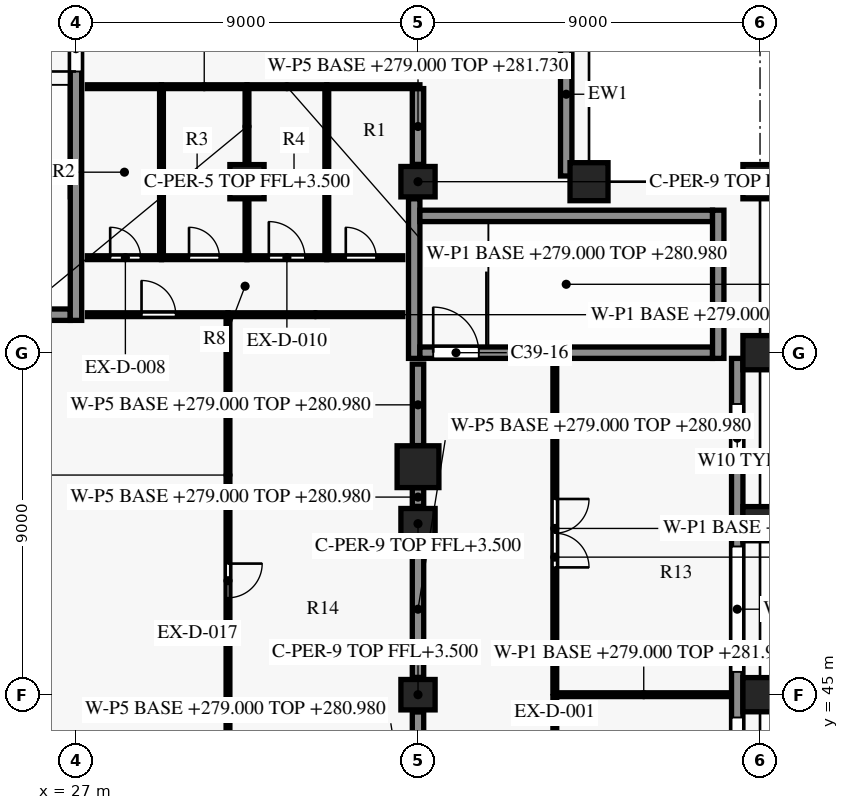
"""IFC4 building model, lengths in metres.
Left out: names, types, materials, properties, quantities, classifications, styles, units other than length and angle.
Written with IfcOpenShell. Run it as: python <this file> out.ifc"""

import sys

from ifc_helpers import new_model, si_unit, direction, frame, frame_2d, origin, origin_2d, place, context, subcontext, project, spatial, rectangle, extrude, element, fill, save


model = new_model("IFC4")
c1 = context("Model", 3, precision=1e-05, world=origin(), true_north=direction((0.0, 1.0)))
c2 = subcontext(c1, "Body", "Model", "MODEL_VIEW")
j1 = project(units=[si_unit("LENGTHUNIT", "METRE"), si_unit("PLANEANGLEUNIT", "RADIAN")], contexts=[c1])
p1 = place(None, origin())
s1 = spatial("IfcSite", under=j1, at=p1, CompositionType="ELEMENT")
p2 = place(p1, origin())
s2 = spatial("IfcBuilding", under=s1, at=p2, CompositionType="ELEMENT")
p3 = place(p2, frame((0.0, 0.0, 279.0)))
s3 = spatial("IfcBuildingStorey", under=s2, at=p3, CompositionType="ELEMENT", Elevation=279.0)
for number, where, z_axis, x_axis in (
    (1, (45.0, 45.0, 0.0), (0.0, 0.0, 1.0), (0.0, 1.0, 0.0)),
    (2, (45.0, 49.5, 0.0), (0.0, 0.0, 1.0), (0.0, 1.0, 0.0)),
    (3, (45.0, 54.0, 0.0), (0.0, 0.0, 1.0), (0.0, 1.0, 0.0)),
    (4, (45.0, 58.5, 0.0), (0.0, 0.0, 1.0), (0.0, 1.0, 0.0)),
):
    element("IfcColumn", number, at=place(p3, frame(where, z_axis=z_axis, x_axis=x_axis)), inside=s3, PredefinedType="COLUMN", context=c2, shape_type="SweptSolid", body=[
        extrude(rectangle(XDim=0.9, YDim=0.9, at=origin_2d()), origin(), (0.0, 0.0, 1.0), 3.8),
    ])
p4 = place(p3, frame((40.5, 58.5, 0.0), z_axis=(0.0, 0.0, 1.0), x_axis=(1.0, 0.0, 0.0)))
e5 = element("IfcColumn", 5, at=p4, inside=s3, PredefinedType="COLUMN", context=c2, shape_type="SweptSolid", body=[
    extrude(rectangle(XDim=1.0, YDim=1.0, at=origin_2d()), origin(), (0.0, 0.0, 1.0), 3.8),
])
p5 = place(p3, frame((36.0, 51.0, 0.0), z_axis=(0.0, 0.0, 1.0), x_axis=(1.0, 0.0, 0.0)))
e6 = element("IfcColumn", 6, at=p5, inside=s3, PredefinedType="COLUMN", context=c2, shape_type="SweptSolid", body=[
    extrude(rectangle(XDim=1.1, YDim=1.1, at=origin_2d()), origin(), (0.0, 0.0, 1.0), 3.8),
])
p6 = place(p3, frame((44.4, 53.85, 0.0), z_axis=(0.0, 0.0, 1.0), x_axis=(0.0, -1.0, 0.0)))
e7 = element("IfcWall", 7, at=p6, inside=s3, PredefinedType="SOLIDWALL", context=c2, shape_type="SweptSolid", body=[
    extrude(rectangle(XDim=21.602, YDim=0.3, at=frame_2d((10.801, 0.0))), origin(), (0.0, 0.0, 1.0), 3.15),
])
p7 = place(p6, frame((1.2, 0.0, 0.75)))
e8 = element("IfcOpeningElement", 8, at=p7, cuts=e7, PredefinedType="OPENING", context=c2, shape_type="SweptSolid", body=[
    extrude(rectangle(XDim=1.8, YDim=1.8, at=frame_2d((0.9, 0.9))), frame((0.0, 0.16, 0.0), z_axis=(0.0, -1.0, 0.0), x_axis=(1.0, 0.0, 0.0)), (0.0, 0.0, 1.0), 0.32),
])
p8 = place(p6, frame((4.95, 0.0, 0.15)))
e9 = element("IfcOpeningElement", 9, at=p8, cuts=e7, PredefinedType="OPENING", context=c2, shape_type="SweptSolid", body=[
    extrude(rectangle(XDim=3.3, YDim=2.4, at=frame_2d((1.65, 1.2))), frame((0.0, 0.16, 0.0), z_axis=(0.0, -1.0, 0.0), x_axis=(1.0, 0.0, 0.0)), (0.0, 0.0, 1.0), 0.32),
])
p9 = place(p6, frame((9.45, 0.0, 0.15)))
e10 = element("IfcOpeningElement", 10, at=p9, cuts=e7, PredefinedType="OPENING", context=c2, shape_type="SweptSolid", body=[
    extrude(rectangle(XDim=3.3, YDim=2.4, at=frame_2d((1.65, 1.2))), frame((0.0, 0.16, 0.0), z_axis=(0.0, -1.0, 0.0), x_axis=(1.0, 0.0, 0.0)), (0.0, 0.0, 1.0), 0.32),
])
p10 = place(p6, frame((14.7, 0.0, 0.75)))
e11 = element("IfcOpeningElement", 11, at=p10, cuts=e7, PredefinedType="OPENING", context=c2, shape_type="SweptSolid", body=[
    extrude(rectangle(XDim=1.8, YDim=1.8, at=frame_2d((0.9, 0.9))), frame((0.0, 0.16, 0.0), z_axis=(0.0, -1.0, 0.0), x_axis=(1.0, 0.0, 0.0)), (0.0, 0.0, 1.0), 0.32),
])
p11 = place(p6, frame((19.2, 0.0, 0.75)))
e12 = element("IfcOpeningElement", 12, at=p11, cuts=e7, PredefinedType="OPENING", context=c2, shape_type="SweptSolid", body=[
    extrude(rectangle(XDim=1.8, YDim=1.8, at=frame_2d((0.9, 0.9))), frame((0.0, 0.16, 0.0), z_axis=(0.0, -1.0, 0.0), x_axis=(1.0, 0.0, 0.0)), (0.0, 0.0, 1.0), 0.32),
])
p12 = place(p3, frame((39.9, 62.953, 0.0), z_axis=(0.0, 0.0, 1.0), x_axis=(0.0, -1.0, 0.0)))
e13 = element("IfcWall", 13, at=p12, inside=s3, PredefinedType="SOLIDWALL", context=c2, shape_type="SweptSolid", body=[
    extrude(rectangle(XDim=4.303, YDim=0.3, at=frame_2d((2.151, 0.0))), origin(), (0.0, 0.0, 1.0), 3.15),
])
p13 = place(p3, frame((36.05, 54.0, 0.0), z_axis=(0.0, 0.0, 1.0), x_axis=(1.0, 0.0, 0.0)))
e14 = element("IfcWall", 14, at=p13, inside=s3, PredefinedType="SHEAR", context=c2, shape_type="SweptSolid", body=[
    extrude(rectangle(XDim=7.7, YDim=0.3, at=frame_2d((3.85, 0.0))), origin(), (0.0, 0.0, 1.0), 3.5),
])
p14 = place(p13, frame((0.35, 0.0, 0.0)))
e15 = element("IfcOpeningElement", 15, at=p14, cuts=e14, PredefinedType="OPENING", context=c2, shape_type="SweptSolid", body=[
    extrude(rectangle(XDim=1.2, YDim=2.2, at=frame_2d((0.6, 1.1))), frame((0.0, 0.16, 0.0), z_axis=(0.0, -1.0, 0.0), x_axis=(1.0, 0.0, 0.0)), (0.0, 0.0, 1.0), 0.32),
])
p15 = place(p3, frame((23.4, 55.0, 0.0), z_axis=(0.0, 0.0, 1.0), x_axis=(1.0, 0.0, 0.0)))
e16 = element("IfcWall", 16, at=p15, inside=s3, PredefinedType="SHEAR", context=c2, shape_type="SweptSolid", body=[
    extrude(rectangle(XDim=3.45, YDim=0.3, at=frame_2d((1.725, 0.0))), origin(), (0.0, 0.0, 1.0), 3.5),
])
p16 = place(p3, frame((36.05, 57.6, 0.0), z_axis=(0.0, 0.0, 1.0), x_axis=(1.0, 0.0, 0.0)))
e17 = element("IfcWall", 17, at=p16, inside=s3, PredefinedType="SHEAR", context=c2, shape_type="SweptSolid", body=[
    extrude(rectangle(XDim=7.7, YDim=0.3, at=frame_2d((3.85, 0.0))), origin(), (0.0, 0.0, 1.0), 3.5),
])
p17 = place(p3, frame((27.0, 54.85, 0.0), z_axis=(0.0, 0.0, 1.0), x_axis=(0.0, 1.0, 0.0)))
e18 = element("IfcWall", 18, at=p17, inside=s3, PredefinedType="SHEAR", context=c2, shape_type="SweptSolid", body=[
    extrude(rectangle(XDim=8.6, YDim=0.3, at=frame_2d((4.3, 0.0))), origin(), (0.0, 0.0, 1.0), 3.5),
])
p18 = place(p17, frame((6.55, 0.0, 0.0)))
e19 = element("IfcOpeningElement", 19, at=p18, cuts=e18, PredefinedType="OPENING", context=c2, shape_type="SweptSolid", body=[
    extrude(rectangle(XDim=1.2, YDim=2.2, at=frame_2d((0.6, 1.1))), frame((0.0, 0.16, 0.0), z_axis=(0.0, -1.0, 0.0), x_axis=(1.0, 0.0, 0.0)), (0.0, 0.0, 1.0), 0.32),
])
p19 = place(p3, frame((35.9, 53.85, 0.0), z_axis=(0.0, 0.0, 1.0), x_axis=(0.0, 1.0, 0.0)))
e20 = element("IfcWall", 20, at=p19, inside=s3, PredefinedType="SHEAR", context=c2, shape_type="SweptSolid", body=[
    extrude(rectangle(XDim=4.2, YDim=0.3, at=frame_2d((2.1, 0.0))), origin(), (0.0, 0.0, 1.0), 3.5),
])
p20 = place(p3, frame((43.9, 53.85, 0.0), z_axis=(0.0, 0.0, 1.0), x_axis=(0.0, 1.0, 0.0)))
e21 = element("IfcWall", 21, at=p20, inside=s3, PredefinedType="SHEAR", context=c2, shape_type="SweptSolid", body=[
    extrude(rectangle(XDim=3.9, YDim=0.3, at=frame_2d((1.95, 0.0))), origin(), (0.0, 0.0, 1.0), 3.5),
])
p21 = place(p3, frame((36.0, 40.97, 0.0), z_axis=(0.0, 0.0, 1.0), x_axis=(0.0, 1.0, 0.0)))
e22 = element("IfcWall", 22, at=p21, inside=s3, PredefinedType="PARTITIONING", context=c2, shape_type="SweptSolid", body=[
    extrude(rectangle(XDim=3.575, YDim=0.3, at=frame_2d((1.788, 0.0))), origin(), (0.0, 0.0, 1.0), 1.98),
])
p22 = place(p3, frame((39.6, 44.95, 0.0), z_axis=(0.0, 0.0, 1.0), x_axis=(0.0, -1.0, 0.0)))
e23 = element("IfcWall", 23, at=p22, inside=s3, PredefinedType="PARTITIONING", context=c2, shape_type="SweptSolid", body=[
    extrude(rectangle(XDim=4.4, YDim=0.1, at=frame_2d((2.2, 0.0))), origin(), (0.0, 0.0, 1.0), 2.98),
])
p23 = place(p22, frame((1.75, 0.0, 0.0)))
e24 = element("IfcOpeningElement", 24, at=p23, cuts=e23, PredefinedType="OPENING", context=c2, shape_type="SweptSolid", body=[
    extrude(rectangle(XDim=0.9, YDim=2.1, at=frame_2d((0.45, 1.05))), frame((0.0, 0.06, 0.0), z_axis=(0.0, -1.0, 0.0), x_axis=(1.0, 0.0, 0.0)), (0.0, 0.0, 1.0), 0.12),
])
p24 = place(p3, frame((39.65, 45.0, 0.0), z_axis=(0.0, 0.0, 1.0), x_axis=(1.0, 0.0, 0.0)))
e25 = element("IfcWall", 25, at=p24, inside=s3, PredefinedType="PARTITIONING", context=c2, shape_type="SweptSolid", body=[
    extrude(rectangle(XDim=4.58, YDim=0.1, at=frame_2d((2.29, 0.0))), origin(), (0.0, 0.0, 1.0), 2.98),
])
p25 = place(p3, frame((36.0, 45.455, 0.0), z_axis=(0.0, 0.0, 1.0), x_axis=(0.0, 1.0, 0.0)))
e26 = element("IfcWall", 26, at=p25, inside=s3, PredefinedType="PARTITIONING", context=c2, shape_type="SweptSolid", body=[
    extrude(rectangle(XDim=3.59, YDim=0.3, at=frame_2d((1.795, 0.0))), origin(), (0.0, 0.0, 1.0), 1.98),
])
p26 = place(p3, frame((36.0, 49.955, 0.0), z_axis=(0.0, 0.0, 1.0), x_axis=(0.0, 1.0, 0.0)))
e27 = element("IfcWall", 27, at=p26, inside=s3, PredefinedType="PARTITIONING", context=c2, shape_type="SweptSolid", body=[
    extrude(rectangle(XDim=0.49, YDim=0.3, at=frame_2d((0.245, 0.0))), origin(), (0.0, 0.0, 1.0), 1.98),
])
p27 = place(p3, frame((36.0, 51.555, 0.0), z_axis=(0.0, 0.0, 1.0), x_axis=(0.0, 1.0, 0.0)))
e28 = element("IfcWall", 28, at=p27, inside=s3, PredefinedType="PARTITIONING", context=c2, shape_type="SweptSolid", body=[
    extrude(rectangle(XDim=2.145, YDim=0.3, at=frame_2d((1.073, 0.0))), origin(), (0.0, 0.0, 1.0), 1.98),
])
p28 = place(p3, frame((39.6, 53.7, 0.0), z_axis=(0.0, 0.0, 1.0), x_axis=(0.0, -1.0, 0.0)))
e29 = element("IfcWall", 29, at=p28, inside=s3, PredefinedType="PARTITIONING", context=c2, shape_type="SweptSolid", body=[
    extrude(rectangle(XDim=8.65, YDim=0.1, at=frame_2d((4.325, 0.0))), origin(), (0.0, 0.0, 1.0), 2.73),
])
p29 = place(p28, frame((3.55, 0.0, 0.0)))
e30 = element("IfcOpeningElement", 30, at=p29, cuts=e29, PredefinedType="OPENING", context=c2, shape_type="SweptSolid", body=[
    extrude(rectangle(XDim=1.8, YDim=2.1, at=frame_2d((0.9, 1.05))), frame((0.0, 0.06, 0.0), z_axis=(0.0, -1.0, 0.0), x_axis=(1.0, 0.0, 0.0)), (0.0, 0.0, 1.0), 0.12),
])
p30 = place(p3, frame((31.0, 54.95, 0.0), z_axis=(0.0, 0.0, 1.0), x_axis=(0.0, -1.0, 0.0)))
e31 = element("IfcWall", 31, at=p30, inside=s3, PredefinedType="PARTITIONING", context=c2, shape_type="SweptSolid", body=[
    extrude(rectangle(XDim=13.9, YDim=0.1, at=frame_2d((6.95, 0.0))), origin(), (0.0, 0.0, 1.0), 2.98),
])
p31 = place(p30, frame((6.5, 0.0, 0.0)))
e32 = element("IfcOpeningElement", 32, at=p31, cuts=e31, PredefinedType="OPENING", context=c2, shape_type="SweptSolid", body=[
    extrude(rectangle(XDim=0.9, YDim=2.1, at=frame_2d((0.45, 1.05))), frame((0.0, 0.06, 0.0), z_axis=(0.0, -1.0, 0.0), x_axis=(1.0, 0.0, 0.0)), (0.0, 0.0, 1.0), 0.12),
])
p32 = place(p3, frame((27.3, 55.0, 0.0), z_axis=(0.0, 0.0, 1.0), x_axis=(1.0, 0.0, 0.0)))
e33 = element("IfcWall", 33, at=p32, inside=s3, PredefinedType="PARTITIONING", context=c2, shape_type="SweptSolid", body=[
    extrude(rectangle(XDim=3.7, YDim=0.1, at=frame_2d((1.85, 0.0))), origin(), (0.0, 0.0, 1.0), 3.33),
])
p33 = place(p32, frame((1.425, 0.0, 0.0)))
e34 = element("IfcOpeningElement", 34, at=p33, cuts=e33, PredefinedType="OPENING", context=c2, shape_type="SweptSolid", body=[
    extrude(rectangle(XDim=0.9, YDim=2.1, at=frame_2d((0.45, 1.05))), frame((0.0, 0.06, 0.0), z_axis=(0.0, -1.0, 0.0), x_axis=(1.0, 0.0, 0.0)), (0.0, 0.0, 1.0), 0.12),
])
p34 = place(p3, frame((35.6, 55.0, 0.0), z_axis=(0.0, 0.0, 1.0), x_axis=(-1.0, 0.0, 0.0)))
e35 = element("IfcWall", 35, at=p34, inside=s3, PredefinedType="PARTITIONING", context=c2, shape_type="SweptSolid", body=[
    extrude(rectangle(XDim=4.6, YDim=0.1, at=frame_2d((2.3, 0.0))), origin(), (0.0, 0.0, 1.0), 2.88),
])
p35 = place(p3, frame((27.3, 56.5, 0.0), z_axis=(0.0, 0.0, 1.0), x_axis=(1.0, 0.0, 0.0)))
e36 = element("IfcWall", 36, at=p35, inside=s3, PredefinedType="PARTITIONING", context=c2, shape_type="SweptSolid", body=[
    extrude(rectangle(XDim=1.95, YDim=0.1, at=frame_2d((0.975, 0.0))), origin(), (0.0, 0.0, 1.0), 3.33),
])
p36 = place(p35, frame((0.6, 0.0, 0.0)))
e37 = element("IfcOpeningElement", 37, at=p36, cuts=e36, PredefinedType="OPENING", context=c2, shape_type="SweptSolid", body=[
    extrude(rectangle(XDim=0.8, YDim=2.1, at=frame_2d((0.4, 1.05))), frame((0.0, 0.06, 0.0), z_axis=(0.0, -1.0, 0.0), x_axis=(1.0, 0.0, 0.0)), (0.0, 0.0, 1.0), 0.12),
])
p37 = place(p3, frame((29.25, 56.5, 0.0), z_axis=(0.0, 0.0, 1.0), x_axis=(1.0, 0.0, 0.0)))
e38 = element("IfcWall", 38, at=p37, inside=s3, PredefinedType="PARTITIONING", context=c2, shape_type="SweptSolid", body=[
    extrude(rectangle(XDim=2.25, YDim=0.1, at=frame_2d((1.125, 0.0))), origin(), (0.0, 0.0, 1.0), 3.33),
])
p38 = place(p37, frame((0.725, 0.0, 0.0)))
e39 = element("IfcOpeningElement", 39, at=p38, cuts=e38, PredefinedType="OPENING", context=c2, shape_type="SweptSolid", body=[
    extrude(rectangle(XDim=0.8, YDim=2.1, at=frame_2d((0.4, 1.05))), frame((0.0, 0.06, 0.0), z_axis=(0.0, -1.0, 0.0), x_axis=(1.0, 0.0, 0.0)), (0.0, 0.0, 1.0), 0.12),
])
p39 = place(p3, frame((31.5, 56.5, 0.0), z_axis=(0.0, 0.0, 1.0), x_axis=(1.0, 0.0, 0.0)))
e40 = element("IfcWall", 40, at=p39, inside=s3, PredefinedType="PARTITIONING", context=c2, shape_type="SweptSolid", body=[
    extrude(rectangle(XDim=2.1, YDim=0.1, at=frame_2d((1.05, 0.0))), origin(), (0.0, 0.0, 1.0), 3.33),
])
p40 = place(p39, frame((0.575, 0.0, 0.0)))
e41 = element("IfcOpeningElement", 41, at=p40, cuts=e40, PredefinedType="OPENING", context=c2, shape_type="SweptSolid", body=[
    extrude(rectangle(XDim=0.95, YDim=2.1, at=frame_2d((0.475, 1.05))), frame((0.0, 0.06, 0.0), z_axis=(0.0, -1.0, 0.0), x_axis=(1.0, 0.0, 0.0)), (0.0, 0.0, 1.0), 0.12),
])
p41 = place(p3, frame((33.6, 56.5, 0.0), z_axis=(0.0, 0.0, 1.0), x_axis=(1.0, 0.0, 0.0)))
e42 = element("IfcWall", 42, at=p41, inside=s3, PredefinedType="PARTITIONING", context=c2, shape_type="SweptSolid", body=[
    extrude(rectangle(XDim=2.0, YDim=0.1, at=frame_2d((1.0, 0.0))), origin(), (0.0, 0.0, 1.0), 2.88),
])
p42 = place(p41, frame((0.5, 0.0, 0.0)))
e43 = element("IfcOpeningElement", 43, at=p42, cuts=e42, PredefinedType="OPENING", context=c2, shape_type="SweptSolid", body=[
    extrude(rectangle(XDim=0.8, YDim=2.1, at=frame_2d((0.4, 1.05))), frame((0.0, 0.06, 0.0), z_axis=(0.0, -1.0, 0.0), x_axis=(1.0, 0.0, 0.0)), (0.0, 0.0, 1.0), 0.12),
])
p43 = place(p3, frame((31.5, 58.045, 0.0), z_axis=(0.0, 0.0, 1.0), x_axis=(0.0, -1.0, 0.0)))
e44 = element("IfcWall", 44, at=p43, inside=s3, PredefinedType="PARTITIONING", context=c2, shape_type="SweptSolid", body=[
    extrude(rectangle(XDim=1.495, YDim=0.1, at=frame_2d((0.748, 0.0))), origin(), (0.0, 0.0, 1.0), 3.33),
])
p44 = place(p3, frame((29.25, 60.95, 0.0), z_axis=(0.0, 0.0, 1.0), x_axis=(0.0, -1.0, 0.0)))
e45 = element("IfcWall", 45, at=p44, inside=s3, PredefinedType="PARTITIONING", context=c2, shape_type="SweptSolid", body=[
    extrude(rectangle(XDim=4.4, YDim=0.1, at=frame_2d((2.2, 0.0))), origin(), (0.0, 0.0, 1.0), 3.33),
])
p45 = place(p3, frame((31.5, 60.95, 0.0), z_axis=(0.0, 0.0, 1.0), x_axis=(0.0, -1.0, 0.0)))
e46 = element("IfcWall", 46, at=p45, inside=s3, PredefinedType="PARTITIONING", context=c2, shape_type="SweptSolid", body=[
    extrude(rectangle(XDim=1.995, YDim=0.1, at=frame_2d((0.998, 0.0))), origin(), (0.0, 0.0, 1.0), 1.98),
])
p46 = place(p3, frame((33.6, 60.95, 0.0), z_axis=(0.0, 0.0, 1.0), x_axis=(0.0, -1.0, 0.0)))
e47 = element("IfcWall", 47, at=p46, inside=s3, PredefinedType="PARTITIONING", context=c2, shape_type="SweptSolid", body=[
    extrude(rectangle(XDim=4.4, YDim=0.1, at=frame_2d((2.2, 0.0))), origin(), (0.0, 0.0, 1.0), 1.98),
])
p47 = place(p3, frame((36.0, 60.95, 0.0), z_axis=(0.0, 0.0, 1.0), x_axis=(0.0, -1.0, 0.0)))
e48 = element("IfcWall", 48, at=p47, inside=s3, PredefinedType="PARTITIONING", context=c2, shape_type="SweptSolid", body=[
    extrude(rectangle(XDim=1.995, YDim=0.3, at=frame_2d((0.998, 0.0))), origin(), (0.0, 0.0, 1.0), 2.73),
])
p48 = place(p3, frame((27.3, 61.0, 0.0), z_axis=(0.0, 0.0, 1.0), x_axis=(1.0, 0.0, 0.0)))
e49 = element("IfcWall", 49, at=p48, inside=s3, PredefinedType="PARTITIONING", context=c2, shape_type="SweptSolid", body=[
    extrude(rectangle(XDim=1.95, YDim=0.1, at=frame_2d((0.975, 0.0))), origin(), (0.0, 0.0, 1.0), 3.33),
])
p49 = place(p3, frame((29.25, 61.0, 0.0), z_axis=(0.0, 0.0, 1.0), x_axis=(1.0, 0.0, 0.0)))
e50 = element("IfcWall", 50, at=p49, inside=s3, PredefinedType="PARTITIONING", context=c2, shape_type="SweptSolid", body=[
    extrude(rectangle(XDim=2.25, YDim=0.1, at=frame_2d((1.125, 0.0))), origin(), (0.0, 0.0, 1.0), 1.98),
])
p50 = place(p3, frame((31.5, 61.0, 0.0), z_axis=(0.0, 0.0, 1.0), x_axis=(1.0, 0.0, 0.0)))
e51 = element("IfcWall", 51, at=p50, inside=s3, PredefinedType="PARTITIONING", context=c2, shape_type="SweptSolid", body=[
    extrude(rectangle(XDim=2.1, YDim=0.1, at=frame_2d((1.05, 0.0))), origin(), (0.0, 0.0, 1.0), 1.98),
])
p51 = place(p3, frame((33.6, 61.0, 0.0), z_axis=(0.0, 0.0, 1.0), x_axis=(1.0, 0.0, 0.0)))
e52 = element("IfcWall", 52, at=p51, inside=s3, PredefinedType="PARTITIONING", context=c2, shape_type="SweptSolid", body=[
    extrude(rectangle(XDim=2.45, YDim=0.1, at=frame_2d((1.225, 0.0))), origin(), (0.0, 0.0, 1.0), 2.73),
])
p52 = place(p3, frame((31.5, 58.5, 0.0), z_axis=(0.0, 0.0, 1.0), x_axis=(1.0, 0.0, 0.0)))
e53 = element("IfcColumn", 53, at=p52, inside=s3, PredefinedType="COLUMN", context=c2, shape_type="SweptSolid", body=[
    extrude(rectangle(XDim=0.9, YDim=0.9, at=origin_2d()), origin(), (0.0, 0.0, 1.0), 3.5),
])
for number, where, z_axis, x_axis in (
    (54, (36.0, 45.0, 0.0), (0.0, 0.0, 1.0), (0.0, 1.0, 0.0)),
    (55, (36.0, 49.5, 0.0), (0.0, 0.0, 1.0), (0.0, 1.0, 0.0)),
    (56, (36.0, 58.5, 0.0), (0.0, 0.0, 1.0), (0.0, 1.0, 0.0)),
):
    element("IfcColumn", number, at=place(p3, frame(where, z_axis=z_axis, x_axis=x_axis)), inside=s3, PredefinedType="COLUMN", context=c2, shape_type="SweptSolid", body=[
        extrude(rectangle(XDim=0.9, YDim=0.8, at=origin_2d()), origin(), (0.0, 0.0, 1.0), 3.5),
    ])
p53 = place(p7, origin())
e57 = element("IfcWindow", 57, at=p53, inside=s3, PartitioningType="SINGLE_PANEL", PredefinedType="WINDOW", context=c2, shape_type="SweptSolid", body=[
    extrude(rectangle(XDim=1.8, YDim=1.8, at=frame_2d((0.9, 0.9))), frame((0.0, 0.03, 0.0), z_axis=(0.0, -1.0, 0.0), x_axis=(1.0, 0.0, 0.0)), (0.0, 0.0, 1.0), 0.06),
])
fill(e8, e57)
p54 = place(p8, origin())
e58 = element("IfcWindow", 58, at=p54, inside=s3, PartitioningType="SINGLE_PANEL", PredefinedType="WINDOW", context=c2, shape_type="SweptSolid", body=[
    extrude(rectangle(XDim=3.3, YDim=2.4, at=frame_2d((1.65, 1.2))), frame((0.0, 0.03, 0.0), z_axis=(0.0, -1.0, 0.0), x_axis=(1.0, 0.0, 0.0)), (0.0, 0.0, 1.0), 0.06),
])
fill(e9, e58)
p55 = place(p9, origin())
e59 = element("IfcWindow", 59, at=p55, inside=s3, PartitioningType="SINGLE_PANEL", PredefinedType="WINDOW", context=c2, shape_type="SweptSolid", body=[
    extrude(rectangle(XDim=3.3, YDim=2.4, at=frame_2d((1.65, 1.2))), frame((0.0, 0.03, 0.0), z_axis=(0.0, -1.0, 0.0), x_axis=(1.0, 0.0, 0.0)), (0.0, 0.0, 1.0), 0.06),
])
fill(e10, e59)
p56 = place(p18, origin())
e60 = element("IfcDoor", 60, at=p56, inside=s3, OperationType="SINGLE_SWING_LEFT", PredefinedType="DOOR", context=c2, shape_type="SweptSolid", body=[
    extrude(rectangle(XDim=1.2, YDim=2.2, at=frame_2d((0.6, 1.1))), frame((0.0, 0.025, 0.0), z_axis=(0.0, -1.0, 0.0), x_axis=(1.0, 0.0, 0.0)), (0.0, 0.0, 1.0), 0.05),
])
fill(e19, e60)
p57 = place(p14, origin())
e61 = element("IfcDoor", 61, at=p57, inside=s3, OperationType="SINGLE_SWING_LEFT", PredefinedType="DOOR", context=c2, shape_type="SweptSolid", body=[
    extrude(rectangle(XDim=1.2, YDim=2.2, at=frame_2d((0.6, 1.1))), frame((0.0, 0.025, 0.0), z_axis=(0.0, -1.0, 0.0), x_axis=(1.0, 0.0, 0.0)), (0.0, 0.0, 1.0), 0.05),
])
fill(e15, e61)
p58 = place(p29, origin())
e62 = element("IfcDoor", 62, at=p58, inside=s3, OperationType="DOUBLE_DOOR_SINGLE_SWING", PredefinedType="DOOR", context=c2, shape_type="SweptSolid", body=[
    extrude(rectangle(XDim=1.8, YDim=2.1, at=frame_2d((0.9, 1.05))), frame((0.0, 0.025, 0.0), z_axis=(0.0, -1.0, 0.0), x_axis=(1.0, 0.0, 0.0)), (0.0, 0.0, 1.0), 0.05),
])
fill(e30, e62)
p59 = place(p33, origin())
e63 = element("IfcDoor", 63, at=p59, inside=s3, OperationType="SINGLE_SWING_RIGHT", PredefinedType="DOOR", context=c2, shape_type="SweptSolid", body=[
    extrude(rectangle(XDim=0.9, YDim=2.1, at=frame_2d((0.45, 1.05))), frame((0.0, 0.025, 0.0), z_axis=(0.0, -1.0, 0.0), x_axis=(1.0, 0.0, 0.0)), (0.0, 0.0, 1.0), 0.05),
])
fill(e34, e63)
p60 = place(p36, origin())
e64 = element("IfcDoor", 64, at=p60, inside=s3, OperationType="SINGLE_SWING_LEFT", PredefinedType="DOOR", context=c2, shape_type="SweptSolid", body=[
    extrude(rectangle(XDim=0.8, YDim=2.1, at=frame_2d((0.4, 1.05))), frame((0.0, 0.025, 0.0), z_axis=(0.0, -1.0, 0.0), x_axis=(1.0, 0.0, 0.0)), (0.0, 0.0, 1.0), 0.05),
])
fill(e37, e64)
p61 = place(p38, origin())
e65 = element("IfcDoor", 65, at=p61, inside=s3, OperationType="SINGLE_SWING_RIGHT", PredefinedType="DOOR", context=c2, shape_type="SweptSolid", body=[
    extrude(rectangle(XDim=0.8, YDim=2.1, at=frame_2d((0.4, 1.05))), frame((0.0, 0.025, 0.0), z_axis=(0.0, -1.0, 0.0), x_axis=(1.0, 0.0, 0.0)), (0.0, 0.0, 1.0), 0.05),
])
fill(e39, e65)
p62 = place(p40, origin())
e66 = element("IfcDoor", 66, at=p62, inside=s3, OperationType="SINGLE_SWING_LEFT", PredefinedType="DOOR", context=c2, shape_type="SweptSolid", body=[
    extrude(rectangle(XDim=0.95, YDim=2.1, at=frame_2d((0.475, 1.05))), frame((0.0, 0.025, 0.0), z_axis=(0.0, -1.0, 0.0), x_axis=(1.0, 0.0, 0.0)), (0.0, 0.0, 1.0), 0.05),
])
fill(e41, e66)
p63 = place(p42, origin())
e67 = element("IfcDoor", 67, at=p63, inside=s3, OperationType="SINGLE_SWING_LEFT", PredefinedType="DOOR", context=c2, shape_type="SweptSolid", body=[
    extrude(rectangle(XDim=0.8, YDim=2.1, at=frame_2d((0.4, 1.05))), frame((0.0, 0.025, 0.0), z_axis=(0.0, -1.0, 0.0), x_axis=(1.0, 0.0, 0.0)), (0.0, 0.0, 1.0), 0.05),
])
fill(e43, e67)
p64 = place(p31, origin())
e68 = element("IfcDoor", 68, at=p64, inside=s3, OperationType="SINGLE_SWING_LEFT", PredefinedType="DOOR", context=c2, shape_type="SweptSolid", body=[
    extrude(rectangle(XDim=0.9, YDim=2.1, at=frame_2d((0.45, 1.05))), frame((0.0, 0.025, 0.0), z_axis=(0.0, -1.0, 0.0), x_axis=(1.0, 0.0, 0.0)), (0.0, 0.0, 1.0), 0.05),
])
fill(e32, e68)
save(model, sys.argv[1])
